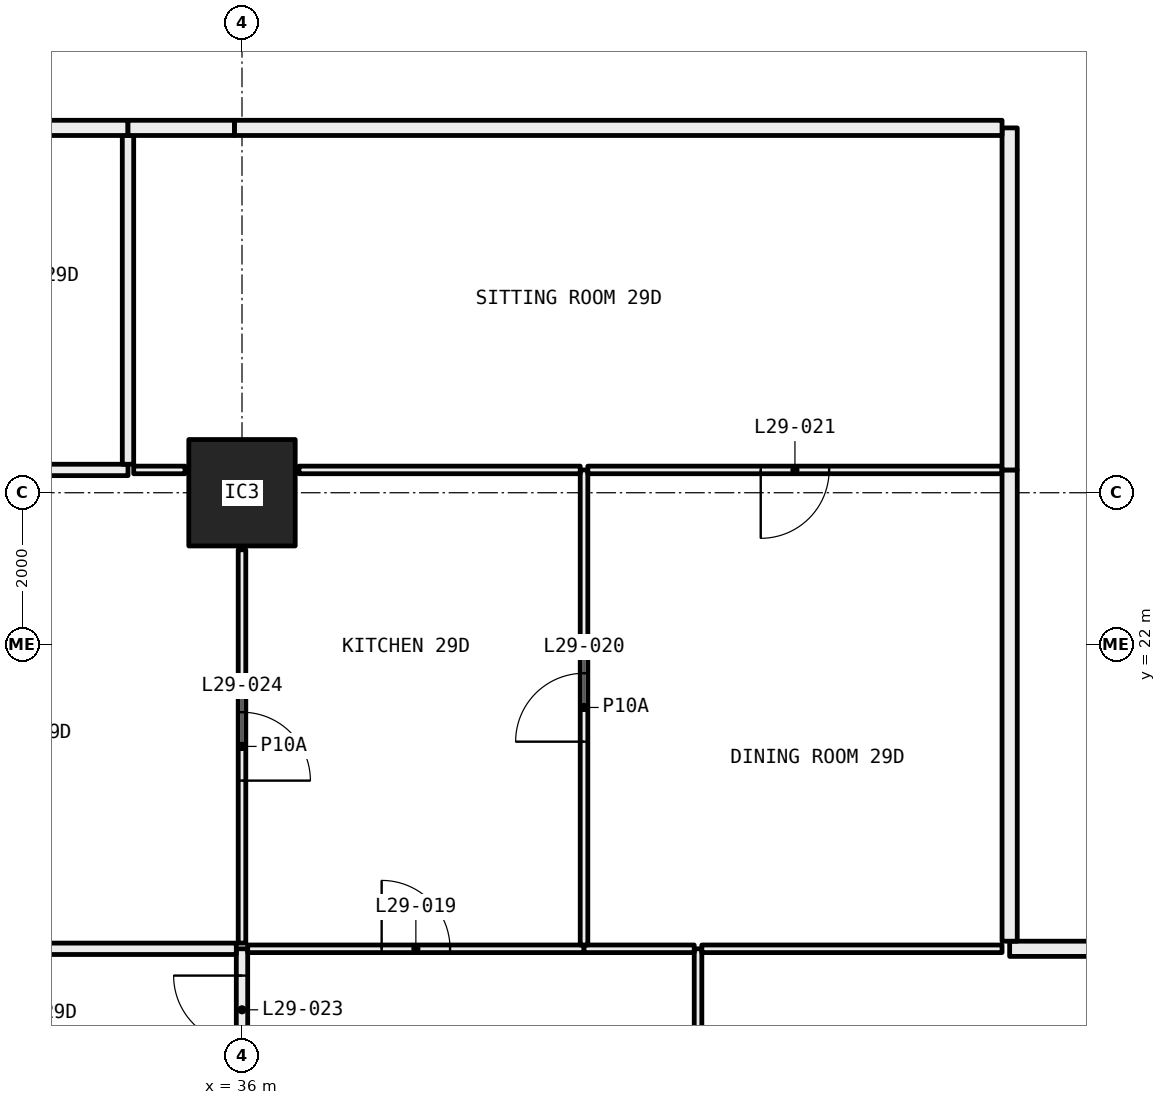
"""IFC4 building model, lengths in metres.
Left out: names, types, materials, properties, quantities, classifications, styles, units other than length and angle.
Written with IfcOpenShell. Run it as: python <this file> out.ifc"""

import sys

from ifc_helpers import new_model, si_unit, direction, frame, frame_2d, origin, origin_2d, place, context, subcontext, project, spatial, rectangle, hollow_rectangle, extrude, element, fill, save


model = new_model("IFC4")
c1 = context("Model", 3, precision=1e-05, world=origin(), true_north=direction((0.0, 1.0)))
c2 = subcontext(c1, "Body", "Model", "MODEL_VIEW")
j1 = project(units=[si_unit("LENGTHUNIT", "METRE"), si_unit("PLANEANGLEUNIT", "RADIAN")], contexts=[c1])
p1 = place(None, origin())
s1 = spatial("IfcSite", under=j1, at=p1, CompositionType="ELEMENT")
p2 = place(p1, origin())
s2 = spatial("IfcBuilding", under=s1, at=p2, CompositionType="ELEMENT")
p3 = place(p2, frame((0.0, 0.0, 113.85)))
s3 = spatial("IfcBuildingStorey", under=s2, at=p3, CompositionType="ELEMENT", Elevation=113.85)
p4 = place(p3, frame((36.0, 24.0, 0.0), z_axis=(0.0, 0.0, 1.0), x_axis=(1.0, 0.0, 0.0)))
e1 = element("IfcColumn", 1, at=p4, inside=s3, PredefinedType="COLUMN", context=c2, shape_type="SweptSolid", body=[
    extrude(hollow_rectangle(XDim=1.4, YDim=1.4, WallThickness=0.06, at=origin_2d()), origin(), (0.0, 0.0, 1.0), 3.05),
])
p5 = place(p3, frame((36.0, 16.395, 0.0), z_axis=(0.0, 0.0, 1.0), x_axis=(0.0, 1.0, 0.0)))
e2 = element("IfcWall", 2, at=p5, inside=s3, PredefinedType="PARTITIONING", context=c2, shape_type="SweptSolid", body=[
    extrude(rectangle(XDim=1.605, YDim=0.15, at=frame_2d((0.802, 0.0))), origin(), (0.0, 0.0, 1.0), 2.45),
])
p6 = place(p5, frame((0.353, 0.0, 0.0)))
e3 = element("IfcOpeningElement", 3, at=p6, cuts=e2, PredefinedType="OPENING", context=c2, shape_type="SweptSolid", body=[
    extrude(rectangle(XDim=0.9, YDim=2.1, at=frame_2d((0.45, 1.05))), frame((0.0, 0.085, 0.0), z_axis=(0.0, -1.0, 0.0), x_axis=(1.0, 0.0, 0.0)), (0.0, 0.0, 1.0), 0.17),
])
p7 = place(p3, frame((35.925, 18.0, 0.0), z_axis=(0.0, 0.0, 1.0), x_axis=(-1.0, 0.0, 0.0)))
e4 = element("IfcWall", 4, at=p7, inside=s3, PredefinedType="PARTITIONING", context=c2, shape_type="SweptSolid", body=[
    extrude(rectangle(XDim=5.825, YDim=0.15, at=frame_2d((2.913, 0.0))), origin(), (0.0, 0.0, 1.0), 2.45),
])
p8 = place(p3, frame((42.0, 12.72, 0.0), z_axis=(0.0, 0.0, 1.0), x_axis=(0.0, 1.0, 0.0)))
e5 = element("IfcWall", 5, at=p8, inside=s3, PredefinedType="PARTITIONING", context=c2, shape_type="SweptSolid", body=[
    extrude(rectangle(XDim=5.28, YDim=0.1, at=frame_2d((2.64, 0.0))), origin(), (0.0, 0.0, 1.0), 3.05),
])
p9 = place(p8, frame((2.19, 0.0, 0.0)))
e6 = element("IfcOpeningElement", 6, at=p9, cuts=e5, PredefinedType="OPENING", context=c2, shape_type="SweptSolid", body=[
    extrude(rectangle(XDim=0.9, YDim=2.1, at=frame_2d((0.45, 1.05))), frame((0.0, 0.06, 0.0), z_axis=(0.0, -1.0, 0.0), x_axis=(1.0, 0.0, 0.0)), (0.0, 0.0, 1.0), 0.12),
])
p10 = place(p3, frame((40.5, 18.0, 0.0), z_axis=(0.0, 0.0, 1.0), x_axis=(-1.0, 0.0, 0.0)))
e7 = element("IfcWall", 7, at=p10, inside=s3, PredefinedType="PARTITIONING", context=c2, shape_type="SweptSolid", body=[
    extrude(rectangle(XDim=4.425, YDim=0.1, at=frame_2d((2.212, 0.0))), origin(), (0.0, 0.0, 1.0), 2.45),
])
p11 = place(p10, frame((1.762, 0.0, 0.0)))
e8 = element("IfcOpeningElement", 8, at=p11, cuts=e7, PredefinedType="OPENING", context=c2, shape_type="SweptSolid", body=[
    extrude(rectangle(XDim=0.9, YDim=2.1, at=frame_2d((0.45, 1.05))), frame((0.0, 0.06, 0.0), z_axis=(0.0, -1.0, 0.0), x_axis=(1.0, 0.0, 0.0)), (0.0, 0.0, 1.0), 0.12),
])
p12 = place(p3, frame((41.95, 18.0, 0.0), z_axis=(0.0, 0.0, 1.0), x_axis=(-1.0, 0.0, 0.0)))
e9 = element("IfcWall", 9, at=p12, inside=s3, PredefinedType="PARTITIONING", context=c2, shape_type="SweptSolid", body=[
    extrude(rectangle(XDim=1.45, YDim=0.1, at=frame_2d((0.725, 0.0))), origin(), (0.0, 0.0, 1.0), 3.05),
])
p13 = place(p3, frame((46.0, 18.0, 0.0), z_axis=(0.0, 0.0, 1.0), x_axis=(-1.0, 0.0, 0.0)))
e10 = element("IfcWall", 10, at=p13, inside=s3, PredefinedType="PARTITIONING", context=c2, shape_type="SweptSolid", body=[
    extrude(rectangle(XDim=3.95, YDim=0.1, at=frame_2d((1.975, 0.0))), origin(), (0.0, 0.0, 1.0), 3.05),
])
p14 = place(p3, frame((48.0, 18.0, 0.0), z_axis=(0.0, 0.0, 1.0), x_axis=(-1.0, 0.0, 0.0)))
e11 = element("IfcWall", 11, at=p14, inside=s3, PredefinedType="PARTITIONING", context=c2, shape_type="SweptSolid", body=[
    extrude(rectangle(XDim=1.9, YDim=0.2, at=frame_2d((0.95, 0.0))), origin(), (0.0, 0.0, 1.0), 3.05),
])
p15 = place(p3, frame((36.0, 18.075, 0.0), z_axis=(0.0, 0.0, 1.0), x_axis=(0.0, 1.0, 0.0)))
e12 = element("IfcWall", 12, at=p15, inside=s3, PredefinedType="PARTITIONING", context=c2, shape_type="SweptSolid", body=[
    extrude(rectangle(XDim=5.175, YDim=0.1, at=frame_2d((2.587, 0.0))), origin(), (0.0, 0.0, 1.0), 2.45),
])
p16 = place(p15, frame((2.137, 0.0, 0.0)))
e13 = element("IfcOpeningElement", 13, at=p16, cuts=e12, PredefinedType="OPENING", context=c2, shape_type="SweptSolid", body=[
    extrude(rectangle(XDim=0.9, YDim=2.1, at=frame_2d((0.45, 1.05))), frame((0.0, 0.06, 0.0), z_axis=(0.0, -1.0, 0.0), x_axis=(1.0, 0.0, 0.0)), (0.0, 0.0, 1.0), 0.12),
])
p17 = place(p3, frame((34.5, 24.3, 0.0), z_axis=(0.0, 0.0, 1.0), x_axis=(-1.0, 0.0, 0.0)))
e14 = element("IfcWall", 14, at=p17, inside=s3, PredefinedType="PARTITIONING", context=c2, shape_type="SweptSolid", body=[
    extrude(rectangle(XDim=4.4, YDim=0.15, at=frame_2d((2.2, 0.0))), origin(), (0.0, 0.0, 1.0), 3.05),
])
p18 = place(p17, frame((1.75, 0.0, 0.0)))
e15 = element("IfcOpeningElement", 15, at=p18, cuts=e14, PredefinedType="OPENING", context=c2, shape_type="SweptSolid", body=[
    extrude(rectangle(XDim=0.9, YDim=2.1, at=frame_2d((0.45, 1.05))), frame((0.0, 0.085, 0.0), z_axis=(0.0, -1.0, 0.0), x_axis=(1.0, 0.0, 0.0)), (0.0, 0.0, 1.0), 0.17),
])
p19 = place(p3, frame((35.25, 24.3, 0.0), z_axis=(0.0, 0.0, 1.0), x_axis=(-1.0, 0.0, 0.0)))
e16 = element("IfcWall", 16, at=p19, inside=s3, PredefinedType="PARTITIONING", context=c2, shape_type="SweptSolid", body=[
    extrude(rectangle(XDim=0.675, YDim=0.1, at=frame_2d((0.337, 0.0))), origin(), (0.0, 0.0, 1.0), 3.05),
])
p20 = place(p3, frame((40.5, 18.05, 0.0), z_axis=(0.0, 0.0, 1.0), x_axis=(0.0, 1.0, 0.0)))
e17 = element("IfcWall", 17, at=p20, inside=s3, PredefinedType="PARTITIONING", context=c2, shape_type="SweptSolid", body=[
    extrude(rectangle(XDim=6.25, YDim=0.1, at=frame_2d((3.125, 0.0))), origin(), (0.0, 0.0, 1.0), 2.45),
])
p21 = place(p20, frame((2.675, 0.0, 0.0)))
e18 = element("IfcOpeningElement", 18, at=p21, cuts=e17, PredefinedType="OPENING", context=c2, shape_type="SweptSolid", body=[
    extrude(rectangle(XDim=0.9, YDim=2.1, at=frame_2d((0.45, 1.05))), frame((0.0, 0.06, 0.0), z_axis=(0.0, -1.0, 0.0), x_axis=(1.0, 0.0, 0.0)), (0.0, 0.0, 1.0), 0.12),
])
p22 = place(p3, frame((40.45, 24.3, 0.0), z_axis=(0.0, 0.0, 1.0), x_axis=(-1.0, 0.0, 0.0)))
e19 = element("IfcWall", 19, at=p22, inside=s3, PredefinedType="PARTITIONING", context=c2, shape_type="SweptSolid", body=[
    extrude(rectangle(XDim=3.7, YDim=0.1, at=frame_2d((1.85, 0.0))), origin(), (0.0, 0.0, 1.0), 3.05),
])
p23 = place(p3, frame((46.0, 24.3, 0.0), z_axis=(0.0, 0.0, 1.0), x_axis=(-1.0, 0.0, 0.0)))
e20 = element("IfcWall", 20, at=p23, inside=s3, PredefinedType="PARTITIONING", context=c2, shape_type="SweptSolid", body=[
    extrude(rectangle(XDim=5.45, YDim=0.1, at=frame_2d((2.725, 0.0))), origin(), (0.0, 0.0, 1.0), 3.05),
])
p24 = place(p23, frame((2.275, 0.0, 0.0)))
e21 = element("IfcOpeningElement", 21, at=p24, cuts=e20, PredefinedType="OPENING", context=c2, shape_type="SweptSolid", body=[
    extrude(rectangle(XDim=0.9, YDim=2.1, at=frame_2d((0.45, 1.05))), frame((0.0, 0.06, 0.0), z_axis=(0.0, -1.0, 0.0), x_axis=(1.0, 0.0, 0.0)), (0.0, 0.0, 1.0), 0.12),
])
p25 = place(p3, frame((46.1, 18.1, 0.0), z_axis=(0.0, 0.0, 1.0), x_axis=(0.0, 1.0, 0.0)))
e22 = element("IfcWall", 22, at=p25, inside=s3, PredefinedType="PARTITIONING", context=c2, shape_type="SweptSolid", body=[
    extrude(rectangle(XDim=6.2, YDim=0.2, at=frame_2d((3.1, 0.0))), origin(), (0.0, 0.0, 1.0), 2.45),
])
p26 = place(p3, frame((34.5, 24.375, 0.0), z_axis=(0.0, 0.0, 1.0), x_axis=(0.0, 1.0, 0.0)))
e23 = element("IfcWall", 23, at=p26, inside=s3, PredefinedType="PARTITIONING", context=c2, shape_type="SweptSolid", body=[
    extrude(rectangle(XDim=4.325, YDim=0.15, at=frame_2d((2.163, 0.0))), origin(), (0.0, 0.0, 1.0), 3.05),
])
p27 = place(p3, frame((34.5, 28.8, 0.0), z_axis=(0.0, 0.0, 1.0), x_axis=(-1.0, 0.0, 0.0)))
e24 = element("IfcWall", 24, at=p27, inside=s3, PredefinedType="PARTITIONING", context=c2, shape_type="SweptSolid", body=[
    extrude(rectangle(XDim=4.4, YDim=0.2, at=frame_2d((2.2, 0.0))), origin(), (0.0, 0.0, 1.0), 3.05),
])
p28 = place(p3, frame((46.1, 24.3, 0.0), z_axis=(0.0, 0.0, 1.0), x_axis=(0.0, 1.0, 0.0)))
e25 = element("IfcWall", 25, at=p28, inside=s3, PredefinedType="PARTITIONING", context=c2, shape_type="SweptSolid", body=[
    extrude(rectangle(XDim=4.5, YDim=0.2, at=frame_2d((2.25, 0.0))), origin(), (0.0, 0.0, 1.0), 3.05),
])
p29 = place(p3, frame((46.0, 28.8, 0.0), z_axis=(0.0, 0.0, 1.0), x_axis=(-1.0, 0.0, 0.0)))
e26 = element("IfcWall", 26, at=p29, inside=s3, PredefinedType="PARTITIONING", context=c2, shape_type="SweptSolid", body=[
    extrude(rectangle(XDim=10.1, YDim=0.2, at=frame_2d((5.05, 0.0))), origin(), (0.0, 0.0, 1.0), 2.45),
])
p30 = place(p3, frame((35.9, 28.8, 0.0), z_axis=(0.0, 0.0, 1.0), x_axis=(-1.0, 0.0, 0.0)))
e27 = element("IfcWall", 27, at=p30, inside=s3, PredefinedType="PARTITIONING", context=c2, shape_type="SweptSolid", body=[
    extrude(rectangle(XDim=1.4, YDim=0.2, at=frame_2d((0.7, 0.0))), origin(), (0.0, 0.0, 1.0), 3.05),
])
p31 = place(p11, frame((0.9, 0.0, 0.0), x_axis=(-1.0, 0.0, 0.0)))
e28 = element("IfcDoor", 28, at=p31, inside=s3, OperationType="SINGLE_SWING_RIGHT", PredefinedType="DOOR", context=c2, shape_type="SweptSolid", body=[
    extrude(rectangle(XDim=0.9, YDim=2.1, at=frame_2d((0.45, 1.05))), frame((0.0, 0.025, 0.0), z_axis=(0.0, -1.0, 0.0), x_axis=(1.0, 0.0, 0.0)), (0.0, 0.0, 1.0), 0.05),
])
fill(e8, e28)
p32 = place(p21, origin())
e29 = element("IfcDoor", 29, at=p32, inside=s3, OperationType="SINGLE_SWING_RIGHT", PredefinedType="DOOR", context=c2, shape_type="SweptSolid", body=[
    extrude(rectangle(XDim=0.9, YDim=2.1, at=frame_2d((0.45, 1.05))), frame((0.0, 0.025, 0.0), z_axis=(0.0, -1.0, 0.0), x_axis=(1.0, 0.0, 0.0)), (0.0, 0.0, 1.0), 0.05),
])
fill(e18, e29)
p33 = place(p24, origin())
e30 = element("IfcDoor", 30, at=p33, inside=s3, OperationType="SINGLE_SWING_LEFT", PredefinedType="DOOR", context=c2, shape_type="SweptSolid", body=[
    extrude(rectangle(XDim=0.9, YDim=2.1, at=frame_2d((0.45, 1.05))), frame((0.0, 0.025, 0.0), z_axis=(0.0, -1.0, 0.0), x_axis=(1.0, 0.0, 0.0)), (0.0, 0.0, 1.0), 0.05),
])
fill(e21, e30)
p34 = place(p6, origin())
e31 = element("IfcDoor", 31, at=p34, inside=s3, OperationType="SINGLE_SWING_LEFT", PredefinedType="DOOR", context=c2, shape_type="SweptSolid", body=[
    extrude(rectangle(XDim=0.9, YDim=2.1, at=frame_2d((0.45, 1.05))), frame((0.0, 0.025, 0.0), z_axis=(0.0, -1.0, 0.0), x_axis=(1.0, 0.0, 0.0)), (0.0, 0.0, 1.0), 0.05),
])
fill(e3, e31)
p35 = place(p16, frame((0.9, 0.0, 0.0), x_axis=(-1.0, 0.0, 0.0)))
e32 = element("IfcDoor", 32, at=p35, inside=s3, OperationType="SINGLE_SWING_LEFT", PredefinedType="DOOR", context=c2, shape_type="SweptSolid", body=[
    extrude(rectangle(XDim=0.9, YDim=2.1, at=frame_2d((0.45, 1.05))), frame((0.0, 0.025, 0.0), z_axis=(0.0, -1.0, 0.0), x_axis=(1.0, 0.0, 0.0)), (0.0, 0.0, 1.0), 0.05),
])
fill(e13, e32)
save(model, sys.argv[1])
